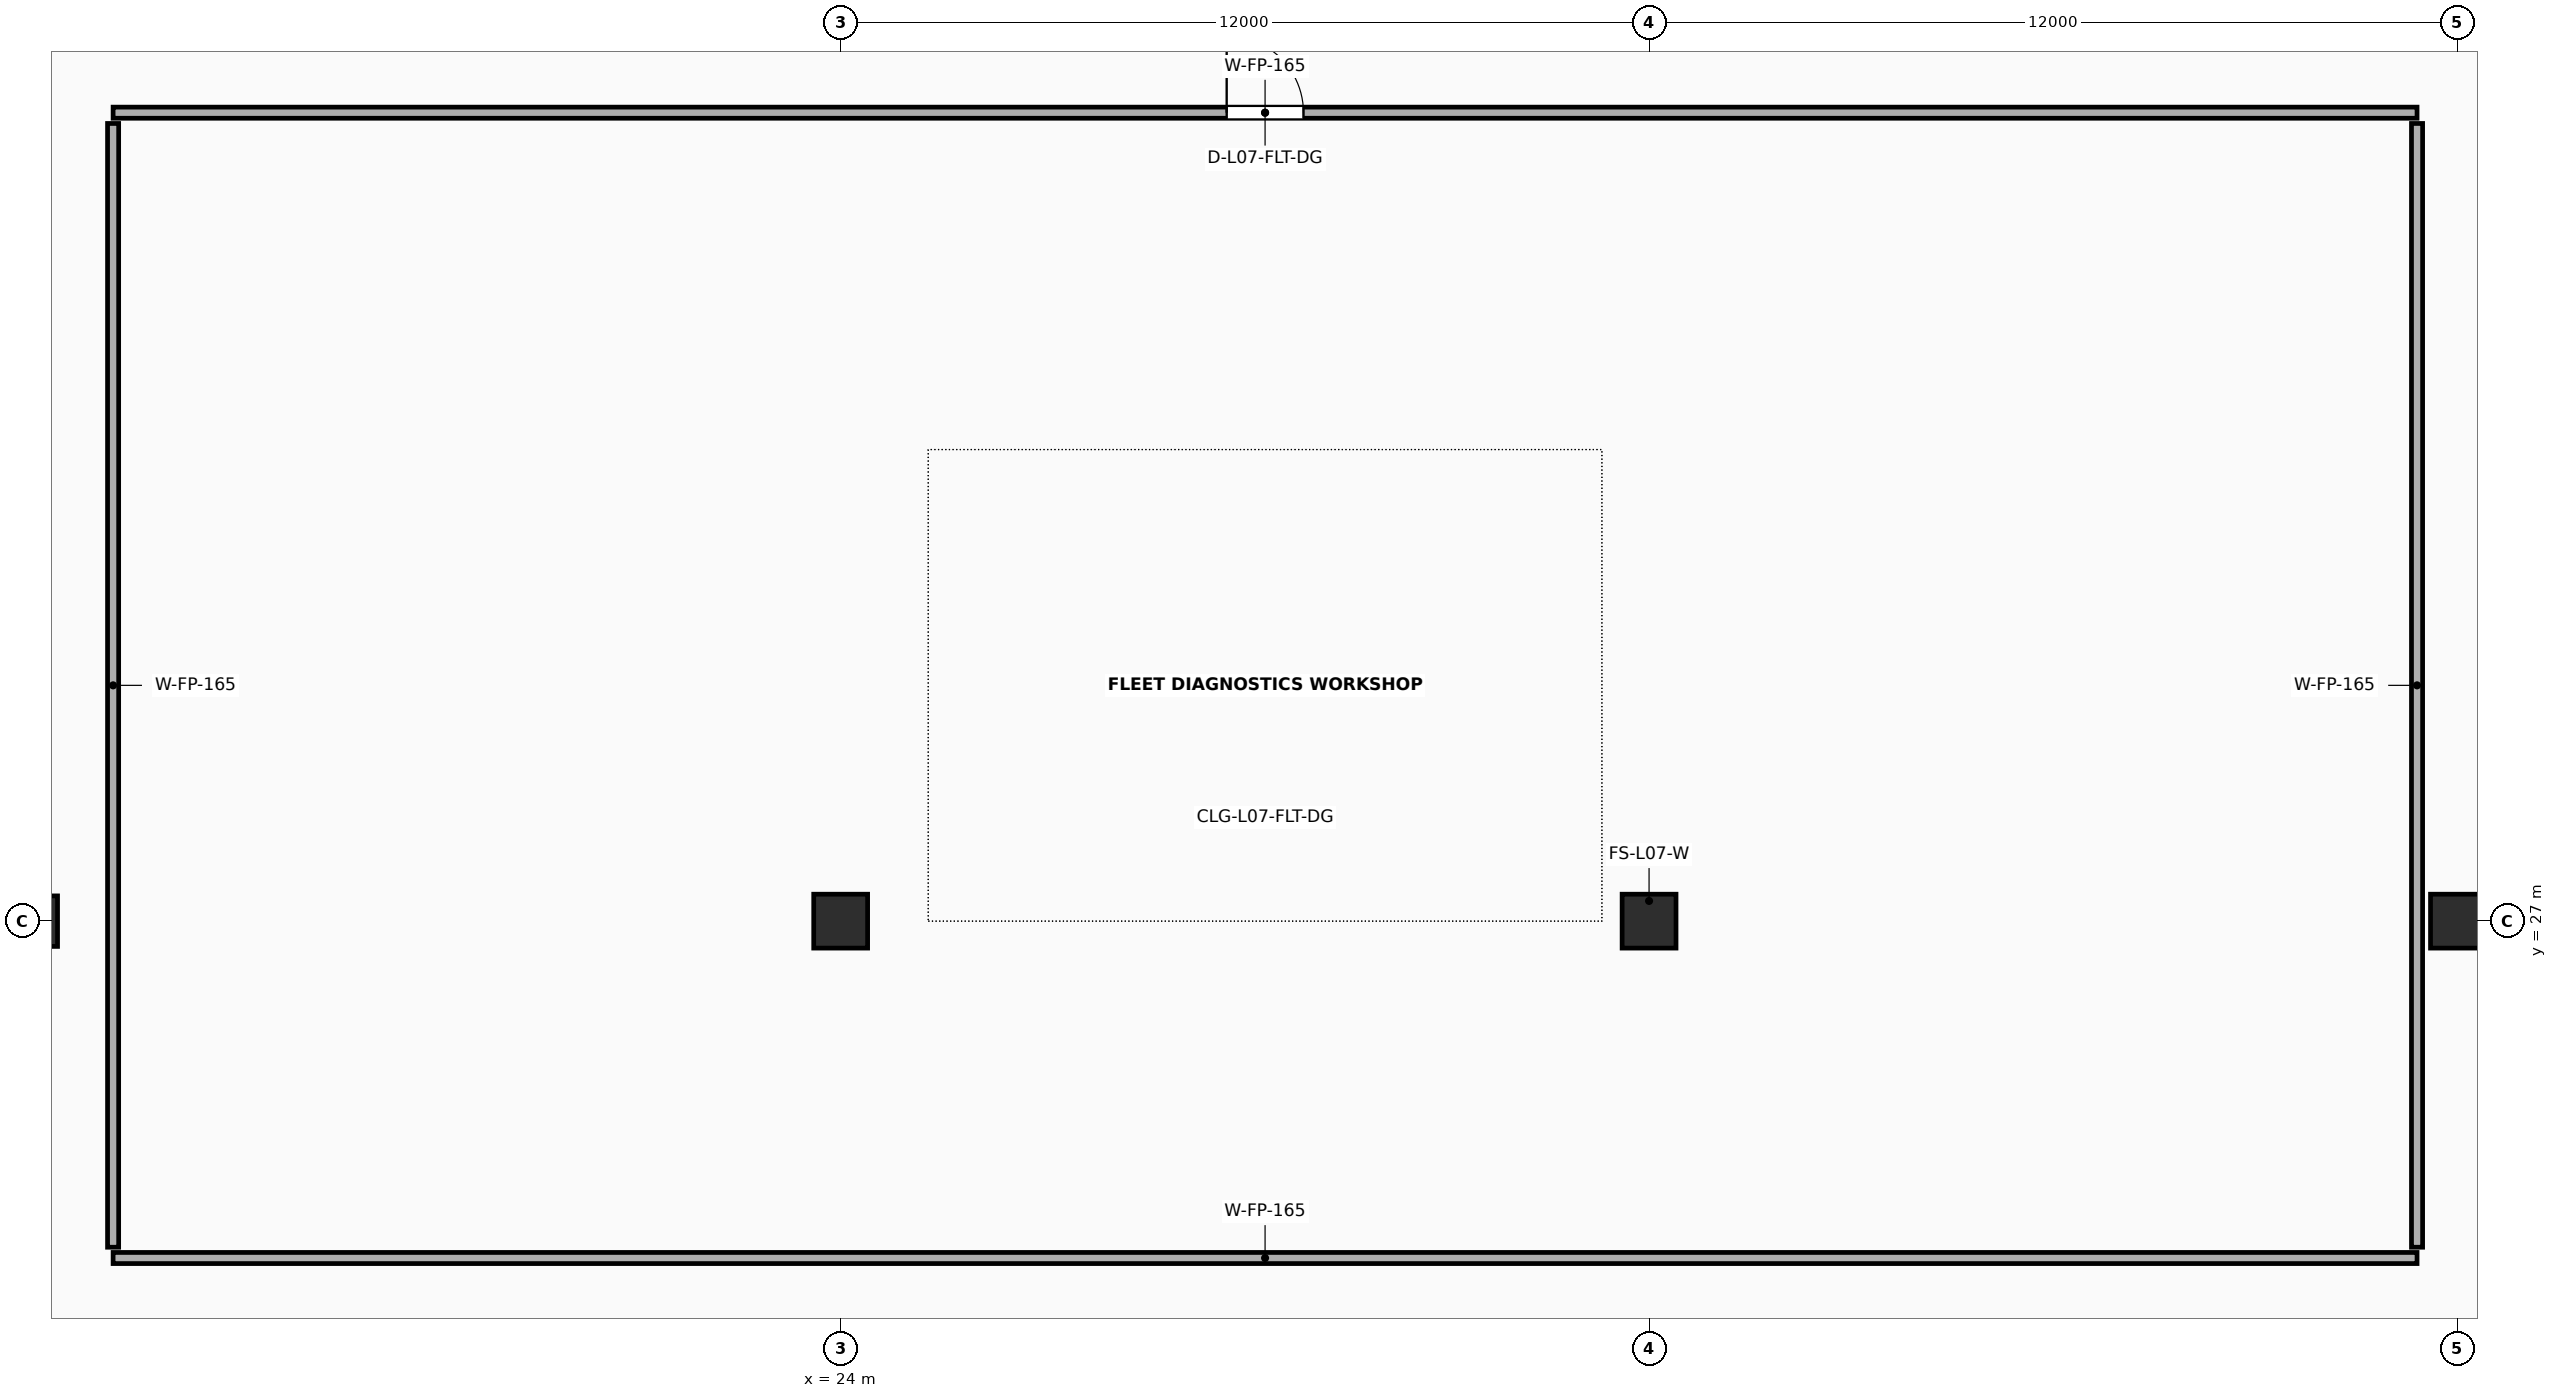
"""IFC4 building model, lengths in metres.
Left out: names, types, materials, properties, quantities, classifications, styles, units other than length and angle.
Written with IfcOpenShell. Run it as: python <this file> out.ifc"""

import sys

from ifc_helpers import new_model, si_unit, direction, frame, frame_2d, origin, origin_2d, place, context, subcontext, project, spatial, rectangle, extrude, element, fill, save


model = new_model("IFC4")
c1 = context("Model", 3, precision=1e-05, world=origin(), true_north=direction((0.0, 1.0)))
c2 = subcontext(c1, "Body", "Model", "MODEL_VIEW")
j1 = project(units=[si_unit("LENGTHUNIT", "METRE"), si_unit("PLANEANGLEUNIT", "RADIAN")], contexts=[c1])
p1 = place(None, origin())
s1 = spatial("IfcSite", under=j1, at=p1, CompositionType="ELEMENT")
p2 = place(p1, origin())
s2 = spatial("IfcBuilding", under=s1, at=p2, CompositionType="ELEMENT")
p3 = place(p2, frame((0.0, 0.0, 28.6)))
s3 = spatial("IfcBuildingStorey", under=s2, at=p3, CompositionType="ELEMENT", Elevation=28.6)
p4 = place(p3, frame((12.0, 27.0, 0.0), z_axis=(0.0, 0.0, 1.0), x_axis=(1.0, 0.0, 0.0)))
e1 = element("IfcColumn", 1, at=p4, inside=s3, PredefinedType="COLUMN", context=c2, shape_type="SweptSolid", body=[
    extrude(rectangle(XDim=0.75, YDim=0.75, at=origin_2d()), origin(), (0.0, 0.0, 1.0), 3.8),
])
for number, where, z_axis, x_axis in (
    (2, (24.0, 27.0, 0.0), (0.0, 0.0, 1.0), (1.0, 0.0, 0.0)),
    (3, (36.0, 27.0, 0.0), (0.0, 0.0, 1.0), (1.0, 0.0, 0.0)),
    (4, (48.0, 27.0, 0.0), (0.0, 0.0, 1.0), (1.0, 0.0, 0.0)),
):
    element("IfcColumn", number, at=place(p3, frame(where, z_axis=z_axis, x_axis=x_axis)), inside=s3, PredefinedType="COLUMN", context=c2, shape_type="SweptSolid", body=[
        extrude(rectangle(XDim=0.8, YDim=0.8, at=origin_2d()), origin(), (0.0, 0.0, 1.0), 3.8),
    ])
p5 = place(p3, frame((13.2, 22.0, 0.0), z_axis=(0.0, 0.0, 1.0), x_axis=(1.0, 0.0, 0.0)))
e5 = element("IfcWall", 5, at=p5, inside=s3, PredefinedType="PARTITIONING", context=c2, shape_type="SweptSolid", body=[
    extrude(rectangle(XDim=34.2, YDim=0.165, at=frame_2d((17.1, 0.0))), origin(), (0.0, 0.0, 1.0), 2.64),
])
p6 = place(p3, frame((13.2, 39.0, 0.0), z_axis=(0.0, 0.0, 1.0), x_axis=(1.0, 0.0, 0.0)))
e6 = element("IfcWall", 6, at=p6, inside=s3, PredefinedType="PARTITIONING", context=c2, shape_type="SweptSolid", body=[
    extrude(rectangle(XDim=34.2, YDim=0.165, at=frame_2d((17.1, 0.0))), origin(), (0.0, 0.0, 1.0), 2.64),
])
p7 = place(p6, frame((16.53, 0.0, 0.0)))
e7 = element("IfcOpeningElement", 7, at=p7, cuts=e6, PredefinedType="OPENING", context=c2, shape_type="SweptSolid", body=[
    extrude(rectangle(XDim=1.14, YDim=2.24, at=frame_2d((0.57, 1.12))), frame((0.0, 0.097, 0.0), z_axis=(0.0, -1.0, 0.0), x_axis=(1.0, 0.0, 0.0)), (0.0, 0.0, 1.0), 0.195),
])
for number, where, z_axis, x_axis in (
    (8, (13.2, 22.16, 0.0), (0.0, 0.0, 1.0), (0.0, 1.0, 0.0)),
    (9, (47.4, 22.16, 0.0), (0.0, 0.0, 1.0), (0.0, 1.0, 0.0)),
):
    element("IfcWall", number, at=place(p3, frame(where, z_axis=z_axis, x_axis=x_axis)), inside=s3, PredefinedType="PARTITIONING", context=c2, shape_type="SweptSolid", body=[
        extrude(rectangle(XDim=16.68, YDim=0.165, at=frame_2d((8.34, 0.0))), origin(), (0.0, 0.0, 1.0), 2.64),
    ])
p8 = place(p7, origin())
e10 = element("IfcDoor", 10, at=p8, inside=s3, OperationType="SINGLE_SWING_LEFT", PredefinedType="DOOR", context=c2, shape_type="SweptSolid", body=[
    extrude(rectangle(XDim=1.14, YDim=2.24, at=frame_2d((0.57, 1.12))), frame((0.0, 0.025, 0.0), z_axis=(0.0, -1.0, 0.0), x_axis=(1.0, 0.0, 0.0)), (0.0, 0.0, 1.0), 0.05),
])
fill(e7, e10)
save(model, sys.argv[1])
